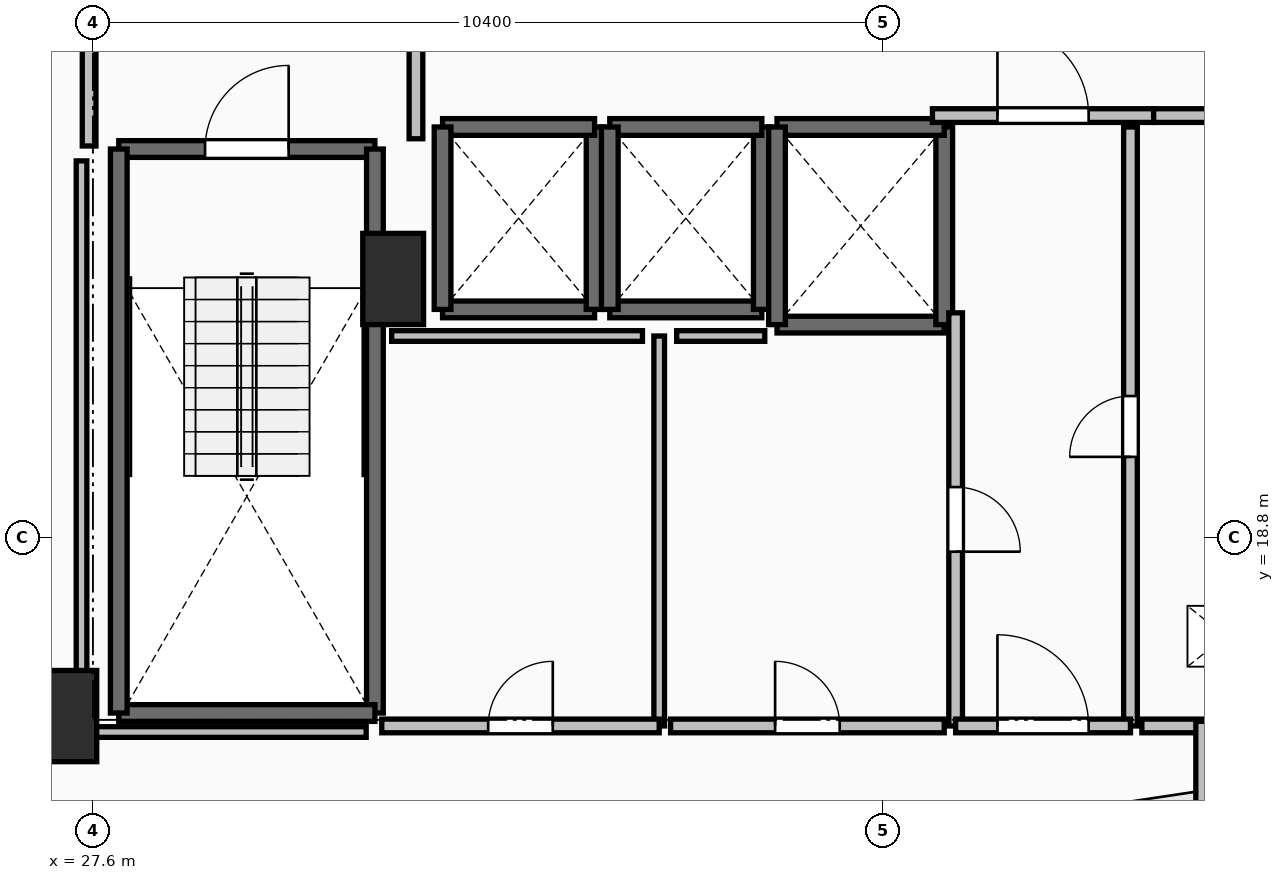
"""IFC4 building model, lengths in metres.
Left out: names, types, materials, properties, quantities, classifications, styles, units other than length and angle.
Written with IfcOpenShell. Run it as: python <this file> out.ifc"""

import sys

from ifc_helpers import new_model, si_unit, direction, frame, frame_2d, origin, origin_2d, place, context, subcontext, project, spatial, rectangle, extrude, element, fill, save


model = new_model("IFC4")
c1 = context("Model", 3, precision=1e-05, world=origin(), true_north=direction((0.0, 1.0)))
c2 = subcontext(c1, "Body", "Model", "MODEL_VIEW")
j1 = project(units=[si_unit("LENGTHUNIT", "METRE"), si_unit("PLANEANGLEUNIT", "RADIAN")], contexts=[c1])
p1 = place(None, origin())
s1 = spatial("IfcSite", under=j1, at=p1, CompositionType="ELEMENT")
p2 = place(p1, origin())
s2 = spatial("IfcBuilding", under=s1, at=p2, CompositionType="ELEMENT")
p3 = place(p2, frame((0.0, 0.0, 113.8)))
s3 = spatial("IfcBuildingStorey", under=s2, at=p3, CompositionType="ELEMENT", Elevation=113.8)
for number, where, z_axis, x_axis in (
    (1, (27.25, 16.45, 0.0), (0.0, 0.0, 1.0), (1.0, 0.0, 0.0)),
    (2, (31.55, 22.2, 0.0), (0.0, 0.0, 1.0), (1.0, 0.0, 0.0)),
):
    element("IfcColumn", number, at=place(p3, frame(where, z_axis=z_axis, x_axis=x_axis)), inside=s3, PredefinedType="PILASTER", context=c2, shape_type="SweptSolid", body=[
        extrude(rectangle(XDim=0.8, YDim=1.2, at=origin_2d()), origin(), (0.0, 0.0, 1.0), 3.5),
    ])
p4 = place(p3, frame((27.94, 23.91, 0.0), z_axis=(0.0, 0.0, 1.0), x_axis=(1.0, 0.0, 0.0)))
e3 = element("IfcWall", 3, at=p4, inside=s3, PredefinedType="SOLIDWALL", context=c2, shape_type="SweptSolid", body=[
    extrude(rectangle(XDim=3.37, YDim=0.22, at=frame_2d((1.685, 0.0))), origin(), (0.0, 0.0, 1.0), 3.24),
])
p5 = place(p4, frame((1.135, 0.0, 0.0)))
e4 = element("IfcOpeningElement", 4, at=p5, cuts=e3, PredefinedType="OPENING", context=c2, shape_type="SweptSolid", body=[
    extrude(rectangle(XDim=1.1, YDim=2.15, at=frame_2d((0.55, 1.075))), frame((0.0, 0.125, 0.0), z_axis=(0.0, -1.0, 0.0), x_axis=(1.0, 0.0, 0.0)), (0.0, 0.0, 1.0), 0.25),
])
p6 = place(p3, frame((31.31, 23.91, 0.0), z_axis=(0.0, 0.0, 1.0), x_axis=(0.0, -1.0, 0.0)))
e5 = element("IfcWall", 5, at=p6, inside=s3, PredefinedType="SOLIDWALL", context=c2, shape_type="SweptSolid", body=[
    extrude(rectangle(XDim=7.42, YDim=0.22, at=frame_2d((3.71, 0.0))), origin(), (0.0, 0.0, 1.0), 3.24),
])
p7 = place(p3, frame((31.31, 16.49, 0.0), z_axis=(0.0, 0.0, 1.0), x_axis=(-1.0, 0.0, 0.0)))
e6 = element("IfcWall", 6, at=p7, inside=s3, PredefinedType="SOLIDWALL", context=c2, shape_type="SweptSolid", body=[
    extrude(rectangle(XDim=3.37, YDim=0.22, at=frame_2d((1.685, 0.0))), origin(), (0.0, 0.0, 1.0), 3.24),
])
p8 = place(p3, frame((27.94, 16.49, 0.0), z_axis=(0.0, 0.0, 1.0), x_axis=(0.0, 1.0, 0.0)))
e7 = element("IfcWall", 7, at=p8, inside=s3, PredefinedType="SOLIDWALL", context=c2, shape_type="SweptSolid", body=[
    extrude(rectangle(XDim=7.42, YDim=0.22, at=frame_2d((3.71, 0.0))), origin(), (0.0, 0.0, 1.0), 3.24),
])
p9 = place(p3, frame((32.2, 21.8, 0.0), z_axis=(0.0, 0.0, 1.0), x_axis=(1.0, 0.0, 0.0)))
e8 = element("IfcWall", 8, at=p9, inside=s3, PredefinedType="SOLIDWALL", context=c2, shape_type="SweptSolid", body=[
    extrude(rectangle(XDim=2.0, YDim=0.22, at=frame_2d((1.0, 0.0))), origin(), (0.0, 0.0, 1.0), 3.24),
])
p10 = place(p3, frame((34.2, 21.8, 0.0), z_axis=(0.0, 0.0, 1.0), x_axis=(0.0, 1.0, 0.0)))
e9 = element("IfcWall", 9, at=p10, inside=s3, PredefinedType="SOLIDWALL", context=c2, shape_type="SweptSolid", body=[
    extrude(rectangle(XDim=2.4, YDim=0.22, at=frame_2d((1.2, 0.0))), origin(), (0.0, 0.0, 1.0), 3.24),
])
p11 = place(p3, frame((34.2, 24.2, 0.0), z_axis=(0.0, 0.0, 1.0), x_axis=(-1.0, 0.0, 0.0)))
e10 = element("IfcWall", 10, at=p11, inside=s3, PredefinedType="SOLIDWALL", context=c2, shape_type="SweptSolid", body=[
    extrude(rectangle(XDim=2.0, YDim=0.22, at=frame_2d((1.0, 0.0))), origin(), (0.0, 0.0, 1.0), 3.24),
])
p12 = place(p3, frame((32.2, 24.2, 0.0), z_axis=(0.0, 0.0, 1.0), x_axis=(0.0, -1.0, 0.0)))
e11 = element("IfcWall", 11, at=p12, inside=s3, PredefinedType="SOLIDWALL", context=c2, shape_type="SweptSolid", body=[
    extrude(rectangle(XDim=2.4, YDim=0.22, at=frame_2d((1.2, 0.0))), origin(), (0.0, 0.0, 1.0), 3.24),
])
p13 = place(p3, frame((34.4, 21.8, 0.0), z_axis=(0.0, 0.0, 1.0), x_axis=(1.0, 0.0, 0.0)))
e12 = element("IfcWall", 12, at=p13, inside=s3, PredefinedType="SOLIDWALL", context=c2, shape_type="SweptSolid", body=[
    extrude(rectangle(XDim=2.0, YDim=0.22, at=frame_2d((1.0, 0.0))), origin(), (0.0, 0.0, 1.0), 3.24),
])
p14 = place(p3, frame((36.4, 21.8, 0.0), z_axis=(0.0, 0.0, 1.0), x_axis=(0.0, 1.0, 0.0)))
e13 = element("IfcWall", 13, at=p14, inside=s3, PredefinedType="SOLIDWALL", context=c2, shape_type="SweptSolid", body=[
    extrude(rectangle(XDim=2.4, YDim=0.22, at=frame_2d((1.2, 0.0))), origin(), (0.0, 0.0, 1.0), 3.24),
])
p15 = place(p3, frame((36.4, 24.2, 0.0), z_axis=(0.0, 0.0, 1.0), x_axis=(-1.0, 0.0, 0.0)))
e14 = element("IfcWall", 14, at=p15, inside=s3, PredefinedType="SOLIDWALL", context=c2, shape_type="SweptSolid", body=[
    extrude(rectangle(XDim=2.0, YDim=0.22, at=frame_2d((1.0, 0.0))), origin(), (0.0, 0.0, 1.0), 3.24),
])
p16 = place(p3, frame((34.4, 24.2, 0.0), z_axis=(0.0, 0.0, 1.0), x_axis=(0.0, -1.0, 0.0)))
e15 = element("IfcWall", 15, at=p16, inside=s3, PredefinedType="SOLIDWALL", context=c2, shape_type="SweptSolid", body=[
    extrude(rectangle(XDim=2.4, YDim=0.22, at=frame_2d((1.2, 0.0))), origin(), (0.0, 0.0, 1.0), 3.24),
])
p17 = place(p3, frame((36.6, 21.6, 0.0), z_axis=(0.0, 0.0, 1.0), x_axis=(1.0, 0.0, 0.0)))
e16 = element("IfcWall", 16, at=p17, inside=s3, PredefinedType="SOLIDWALL", context=c2, shape_type="SweptSolid", body=[
    extrude(rectangle(XDim=2.2, YDim=0.22, at=frame_2d((1.1, 0.0))), origin(), (0.0, 0.0, 1.0), 3.24),
])
p18 = place(p3, frame((38.8, 21.6, 0.0), z_axis=(0.0, 0.0, 1.0), x_axis=(0.0, 1.0, 0.0)))
e17 = element("IfcWall", 17, at=p18, inside=s3, PredefinedType="SOLIDWALL", context=c2, shape_type="SweptSolid", body=[
    extrude(rectangle(XDim=2.6, YDim=0.22, at=frame_2d((1.3, 0.0))), origin(), (0.0, 0.0, 1.0), 3.24),
])
p19 = place(p3, frame((38.8, 24.2, 0.0), z_axis=(0.0, 0.0, 1.0), x_axis=(-1.0, 0.0, 0.0)))
e18 = element("IfcWall", 18, at=p19, inside=s3, PredefinedType="SOLIDWALL", context=c2, shape_type="SweptSolid", body=[
    extrude(rectangle(XDim=2.2, YDim=0.22, at=frame_2d((1.1, 0.0))), origin(), (0.0, 0.0, 1.0), 3.24),
])
p20 = place(p3, frame((36.6, 24.2, 0.0), z_axis=(0.0, 0.0, 1.0), x_axis=(0.0, -1.0, 0.0)))
e19 = element("IfcWall", 19, at=p20, inside=s3, PredefinedType="SOLIDWALL", context=c2, shape_type="SweptSolid", body=[
    extrude(rectangle(XDim=2.6, YDim=0.22, at=frame_2d((1.3, 0.0))), origin(), (0.0, 0.0, 1.0), 3.24),
])
p21 = place(p3, frame((31.85, 24.045, 0.0), z_axis=(0.0, 0.0, 1.0), x_axis=(0.0, 1.0, 0.0)))
e20 = element("IfcWall", 20, at=p21, inside=s3, PredefinedType="PARTITIONING", context=c2, shape_type="SweptSolid", body=[
    extrude(rectangle(XDim=3.91, YDim=0.18, at=frame_2d((1.955, 0.0))), origin(), (0.0, 0.0, 1.0), 3.24),
])
p22 = place(p21, frame((1.355, 0.0, 0.0)))
e21 = element("IfcOpeningElement", 21, at=p22, cuts=e20, PredefinedType="OPENING", context=c2, shape_type="SweptSolid", body=[
    extrude(rectangle(XDim=1.2, YDim=2.15, at=frame_2d((0.6, 1.075))), frame((0.0, 0.105, 0.0), z_axis=(0.0, -1.0, 0.0), x_axis=(1.0, 0.0, 0.0)), (0.0, 0.0, 1.0), 0.21),
])
p23 = place(p3, frame((27.55, 28.0, 0.0), z_axis=(0.0, 0.0, 1.0), x_axis=(0.0, -1.0, 0.0)))
e22 = element("IfcWall", 22, at=p23, inside=s3, PredefinedType="PARTITIONING", context=c2, shape_type="SweptSolid", body=[
    extrude(rectangle(XDim=4.05, YDim=0.18, at=frame_2d((2.025, 0.0))), origin(), (0.0, 0.0, 1.0), 3.24),
])
p24 = place(p23, frame((1.425, 0.0, 0.0)))
e23 = element("IfcOpeningElement", 23, at=p24, cuts=e22, PredefinedType="OPENING", context=c2, shape_type="SweptSolid", body=[
    extrude(rectangle(XDim=1.2, YDim=2.15, at=frame_2d((0.6, 1.075))), frame((0.0, 0.105, 0.0), z_axis=(0.0, -1.0, 0.0), x_axis=(1.0, 0.0, 0.0)), (0.0, 0.0, 1.0), 0.21),
])
p25 = place(p3, frame((38.645, 24.35, 0.0), z_axis=(0.0, 0.0, 1.0), x_axis=(1.0, 0.0, 0.0)))
e24 = element("IfcWall", 24, at=p25, inside=s3, PredefinedType="PARTITIONING", context=c2, shape_type="SweptSolid", body=[
    extrude(rectangle(XDim=2.91, YDim=0.18, at=frame_2d((1.455, 0.0))), origin(), (0.0, 0.0, 1.0), 3.24),
])
p26 = place(p25, frame((0.855, 0.0, 0.0)))
e25 = element("IfcOpeningElement", 25, at=p26, cuts=e24, PredefinedType="OPENING", context=c2, shape_type="SweptSolid", body=[
    extrude(rectangle(XDim=1.2, YDim=2.15, at=frame_2d((0.6, 1.075))), frame((0.0, 0.105, 0.0), z_axis=(0.0, -1.0, 0.0), x_axis=(1.0, 0.0, 0.0)), (0.0, 0.0, 1.0), 0.21),
])
p27 = place(p3, frame((41.555, 24.35, 0.0), z_axis=(0.0, 0.0, 1.0), x_axis=(1.0, 0.0, 0.0)))
e26 = element("IfcWall", 26, at=p27, inside=s3, PredefinedType="PARTITIONING", context=c2, shape_type="SweptSolid", body=[
    extrude(rectangle(XDim=2.445, YDim=0.18, at=frame_2d((1.223, 0.0))), origin(), (0.0, 0.0, 1.0), 3.24),
])
p28 = place(p27, frame((0.823, 0.0, 0.0)))
e27 = element("IfcOpeningElement", 27, at=p28, cuts=e26, PredefinedType="OPENING", context=c2, shape_type="SweptSolid", body=[
    extrude(rectangle(XDim=0.8, YDim=2.05, at=frame_2d((0.4, 1.025))), frame((0.0, 0.105, 0.0), z_axis=(0.0, -1.0, 0.0), x_axis=(1.0, 0.0, 0.0)), (0.0, 0.0, 1.0), 0.21),
])
p29 = place(p3, frame((41.25, 16.32, 0.0), z_axis=(0.0, 0.0, 1.0), x_axis=(0.0, 1.0, 0.0)))
e28 = element("IfcWall", 28, at=p29, inside=s3, PredefinedType="PARTITIONING", context=c2, shape_type="SweptSolid", body=[
    extrude(rectangle(XDim=7.88, YDim=0.18, at=frame_2d((3.94, 0.0))), origin(), (0.0, 0.0, 1.0), 3.24),
])
p30 = place(p29, frame((3.54, 0.0, 0.0)))
e29 = element("IfcOpeningElement", 29, at=p30, cuts=e28, PredefinedType="OPENING", context=c2, shape_type="SweptSolid", body=[
    extrude(rectangle(XDim=0.8, YDim=2.05, at=frame_2d((0.4, 1.025))), frame((0.0, 0.105, 0.0), z_axis=(0.0, -1.0, 0.0), x_axis=(1.0, 0.0, 0.0)), (0.0, 0.0, 1.0), 0.21),
])
p31 = place(p3, frame((38.95, 21.755, 0.0), z_axis=(0.0, 0.0, 1.0), x_axis=(0.0, -1.0, 0.0)))
e30 = element("IfcWall", 30, at=p31, inside=s3, PredefinedType="PARTITIONING", context=c2, shape_type="SweptSolid", body=[
    extrude(rectangle(XDim=5.435, YDim=0.18, at=frame_2d((2.717, 0.0))), origin(), (0.0, 0.0, 1.0), 3.24),
])
p32 = place(p31, frame((2.292, 0.0, 0.0)))
e31 = element("IfcOpeningElement", 31, at=p32, cuts=e30, PredefinedType="OPENING", context=c2, shape_type="SweptSolid", body=[
    extrude(rectangle(XDim=0.85, YDim=2.1, at=frame_2d((0.425, 1.05))), frame((0.0, 0.105, 0.0), z_axis=(0.0, -1.0, 0.0), x_axis=(1.0, 0.0, 0.0)), (0.0, 0.0, 1.0), 0.21),
])
p33 = place(p3, frame((38.95, 16.32, 0.0), z_axis=(0.0, 0.0, 1.0), x_axis=(1.0, 0.0, 0.0)))
e32 = element("IfcWall", 32, at=p33, inside=s3, PredefinedType="PARTITIONING", context=c2, shape_type="SweptSolid", body=[
    extrude(rectangle(XDim=2.3, YDim=0.18, at=frame_2d((1.15, 0.0))), origin(), (0.0, 0.0, 1.0), 3.24),
])
p34 = place(p33, frame((0.55, 0.0, 0.0)))
e33 = element("IfcOpeningElement", 33, at=p34, cuts=e32, PredefinedType="OPENING", context=c2, shape_type="SweptSolid", body=[
    extrude(rectangle(XDim=1.2, YDim=2.15, at=frame_2d((0.6, 1.075))), frame((0.0, 0.105, 0.0), z_axis=(0.0, -1.0, 0.0), x_axis=(1.0, 0.0, 0.0)), (0.0, 0.0, 1.0), 0.21),
])
p35 = place(p3, frame((41.4, 16.32, 0.0), z_axis=(0.0, 0.0, 1.0), x_axis=(1.0, 0.0, 0.0)))
e34 = element("IfcWall", 34, at=p35, inside=s3, PredefinedType="PARTITIONING", context=c2, shape_type="SweptSolid", body=[
    extrude(rectangle(XDim=3.2, YDim=0.18, at=frame_2d((1.6, 0.0))), origin(), (0.0, 0.0, 1.0), 3.24),
])
p36 = place(p35, frame((1.2, 0.0, 0.0)))
e35 = element("IfcOpeningElement", 35, at=p36, cuts=e34, PredefinedType="OPENING", context=c2, shape_type="SweptSolid", body=[
    extrude(rectangle(XDim=0.8, YDim=2.05, at=frame_2d((0.4, 1.025))), frame((0.0, 0.105, 0.0), z_axis=(0.0, -1.0, 0.0), x_axis=(1.0, 0.0, 0.0)), (0.0, 0.0, 1.0), 0.21),
])
p37 = place(p3, frame((35.05, 16.32, 0.0), z_axis=(0.0, 0.0, 1.0), x_axis=(0.0, 1.0, 0.0)))
e36 = element("IfcWall", 36, at=p37, inside=s3, PredefinedType="PARTITIONING", context=c2, shape_type="SweptSolid", body=[
    extrude(rectangle(XDim=5.13, YDim=0.14, at=frame_2d((2.565, 0.0))), origin(), (0.0, 0.0, 1.0), 3.24),
])
p38 = place(p3, frame((31.4, 16.32, 0.0), z_axis=(0.0, 0.0, 1.0), x_axis=(1.0, 0.0, 0.0)))
e37 = element("IfcWall", 37, at=p38, inside=s3, PredefinedType="PARTITIONING", context=c2, shape_type="SweptSolid", body=[
    extrude(rectangle(XDim=3.65, YDim=0.18, at=frame_2d((1.825, 0.0))), origin(), (0.0, 0.0, 1.0), 3.24),
])
p39 = place(p38, frame((1.4, 0.0, 0.0)))
e38 = element("IfcOpeningElement", 38, at=p39, cuts=e37, PredefinedType="OPENING", context=c2, shape_type="SweptSolid", body=[
    extrude(rectangle(XDim=0.85, YDim=2.1, at=frame_2d((0.425, 1.05))), frame((0.0, 0.105, 0.0), z_axis=(0.0, -1.0, 0.0), x_axis=(1.0, 0.0, 0.0)), (0.0, 0.0, 1.0), 0.21),
])
p40 = place(p3, frame((35.2, 16.32, 0.0), z_axis=(0.0, 0.0, 1.0), x_axis=(1.0, 0.0, 0.0)))
e39 = element("IfcWall", 39, at=p40, inside=s3, PredefinedType="PARTITIONING", context=c2, shape_type="SweptSolid", body=[
    extrude(rectangle(XDim=3.6, YDim=0.18, at=frame_2d((1.8, 0.0))), origin(), (0.0, 0.0, 1.0), 3.24),
])
p41 = place(p40, frame((1.375, 0.0, 0.0)))
e40 = element("IfcOpeningElement", 40, at=p41, cuts=e39, PredefinedType="OPENING", context=c2, shape_type="SweptSolid", body=[
    extrude(rectangle(XDim=0.85, YDim=2.1, at=frame_2d((0.425, 1.05))), frame((0.0, 0.105, 0.0), z_axis=(0.0, -1.0, 0.0), x_axis=(1.0, 0.0, 0.0)), (0.0, 0.0, 1.0), 0.21),
])
p42 = place(p3, frame((42.2, 13.96, 0.0), z_axis=(0.0, 0.0, 1.0), x_axis=(0.0, 1.0, 0.0)))
e41 = element("IfcWall", 41, at=p42, inside=s3, PredefinedType="PARTITIONING", context=c2, shape_type="SweptSolid", body=[
    extrude(rectangle(XDim=2.42, YDim=0.18, at=frame_2d((1.21, 0.0))), origin(), (0.0, 0.0, 1.0), 2.929),
])
p43 = place(p3, frame((34.83, 21.45, 0.0), z_axis=(0.0, 0.0, 1.0), x_axis=(-1.0, 0.0, 0.0)))
e42 = element("IfcWall", 42, at=p43, inside=s3, PredefinedType="PARTITIONING", context=c2, shape_type="SweptSolid", body=[
    extrude(rectangle(XDim=3.3, YDim=0.14, at=frame_2d((1.65, 0.0))), origin(), (0.0, 0.0, 1.0), 3.24),
])
p44 = place(p3, frame((36.439, 21.45, 0.0), z_axis=(0.0, 0.0, 1.0), x_axis=(-1.0, 0.0, 0.0)))
e43 = element("IfcWall", 43, at=p44, inside=s3, PredefinedType="PARTITIONING", context=c2, shape_type="SweptSolid", body=[
    extrude(rectangle(XDim=1.159, YDim=0.14, at=frame_2d((0.58, 0.0))), origin(), (0.0, 0.0, 1.0), 3.24),
])
p45 = place(p3, frame((31.195, 16.24, 0.0), z_axis=(0.0, 0.0, 1.0), x_axis=(-1.0, 0.0, 0.0)))
e44 = element("IfcWall", 44, at=p45, inside=s3, PredefinedType="PARTITIONING", context=c2, shape_type="SweptSolid", body=[
    extrude(rectangle(XDim=3.745, YDim=0.14, at=frame_2d((1.873, 0.0))), origin(), (0.0, 0.0, 1.0), 2.432),
])
p46 = place(p3, frame((27.45, 16.24, 0.0), z_axis=(0.0, 0.0, 1.0), x_axis=(0.0, 1.0, 0.0)))
e45 = element("IfcWall", 45, at=p46, inside=s3, PredefinedType="PARTITIONING", context=c2, shape_type="SweptSolid", body=[
    extrude(rectangle(XDim=7.514, YDim=0.14, at=frame_2d((3.757, 0.0))), origin(), (0.0, 0.0, 1.0), 2.432),
])
p47 = place(p5, origin())
e46 = element("IfcDoor", 46, at=p47, inside=s3, OperationType="SINGLE_SWING_RIGHT", PredefinedType="DOOR", context=c2, shape_type="SweptSolid", body=[
    extrude(rectangle(XDim=1.1, YDim=2.15, at=frame_2d((0.55, 1.075))), frame((0.0, 0.025, 0.0), z_axis=(0.0, -1.0, 0.0), x_axis=(1.0, 0.0, 0.0)), (0.0, 0.0, 1.0), 0.05),
])
fill(e4, e46)
p48 = place(p26, origin())
e47 = element("IfcDoor", 47, at=p48, inside=s3, OperationType="SINGLE_SWING_LEFT", PredefinedType="DOOR", context=c2, shape_type="SweptSolid", body=[
    extrude(rectangle(XDim=1.2, YDim=2.15, at=frame_2d((0.6, 1.075))), frame((0.0, 0.025, 0.0), z_axis=(0.0, -1.0, 0.0), x_axis=(1.0, 0.0, 0.0)), (0.0, 0.0, 1.0), 0.05),
])
fill(e25, e47)
p49 = place(p30, origin())
e48 = element("IfcDoor", 48, at=p49, inside=s3, OperationType="SINGLE_SWING_LEFT", PredefinedType="DOOR", context=c2, shape_type="SweptSolid", body=[
    extrude(rectangle(XDim=0.8, YDim=2.05, at=frame_2d((0.4, 1.025))), frame((0.0, 0.025, 0.0), z_axis=(0.0, -1.0, 0.0), x_axis=(1.0, 0.0, 0.0)), (0.0, 0.0, 1.0), 0.05),
])
fill(e29, e48)
p50 = place(p32, origin())
e49 = element("IfcDoor", 49, at=p50, inside=s3, OperationType="SINGLE_SWING_RIGHT", PredefinedType="DOOR", context=c2, shape_type="SweptSolid", body=[
    extrude(rectangle(XDim=0.85, YDim=2.1, at=frame_2d((0.425, 1.05))), frame((0.0, 0.025, 0.0), z_axis=(0.0, -1.0, 0.0), x_axis=(1.0, 0.0, 0.0)), (0.0, 0.0, 1.0), 0.05),
])
fill(e31, e49)
p51 = place(p34, origin())
e50 = element("IfcDoor", 50, at=p51, inside=s3, OperationType="SINGLE_SWING_LEFT", PredefinedType="DOOR", context=c2, shape_type="SweptSolid", body=[
    extrude(rectangle(XDim=1.2, YDim=2.15, at=frame_2d((0.6, 1.075))), frame((0.0, 0.025, 0.0), z_axis=(0.0, -1.0, 0.0), x_axis=(1.0, 0.0, 0.0)), (0.0, 0.0, 1.0), 0.05),
])
fill(e33, e50)
p52 = place(p39, origin())
e51 = element("IfcDoor", 51, at=p52, inside=s3, OperationType="SINGLE_SWING_RIGHT", PredefinedType="DOOR", context=c2, shape_type="SweptSolid", body=[
    extrude(rectangle(XDim=0.85, YDim=2.1, at=frame_2d((0.425, 1.05))), frame((0.0, 0.025, 0.0), z_axis=(0.0, -1.0, 0.0), x_axis=(1.0, 0.0, 0.0)), (0.0, 0.0, 1.0), 0.05),
])
fill(e38, e51)
p53 = place(p41, origin())
e52 = element("IfcDoor", 52, at=p53, inside=s3, OperationType="SINGLE_SWING_LEFT", PredefinedType="DOOR", context=c2, shape_type="SweptSolid", body=[
    extrude(rectangle(XDim=0.85, YDim=2.1, at=frame_2d((0.425, 1.05))), frame((0.0, 0.025, 0.0), z_axis=(0.0, -1.0, 0.0), x_axis=(1.0, 0.0, 0.0)), (0.0, 0.0, 1.0), 0.05),
])
fill(e40, e52)
save(model, sys.argv[1])
